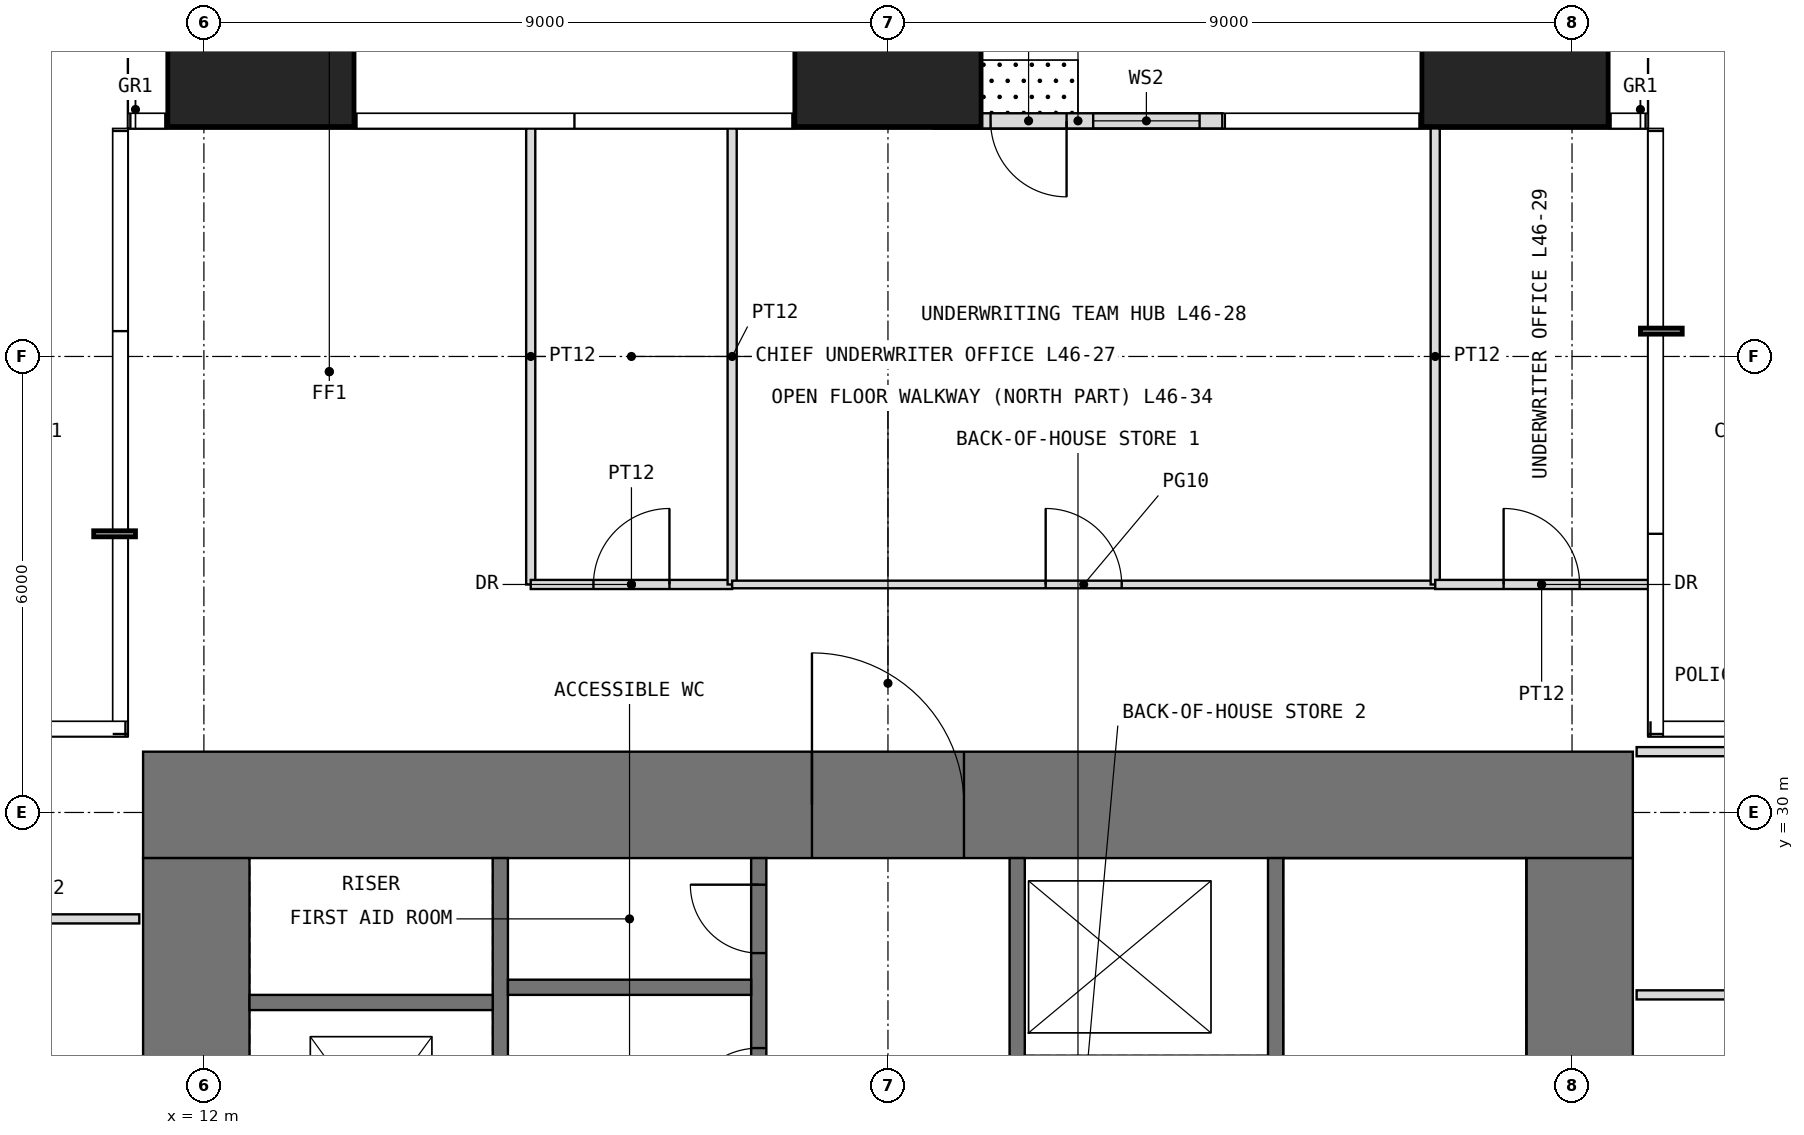
"""IFC4 building model, lengths in metres.
Left out: names, types, materials, properties, quantities, classifications, styles, units other than length and angle.
Written with IfcOpenShell. Run it as: python <this file> out.ifc"""

import sys

from ifc_helpers import new_model, si_unit, direction, frame, frame_2d, origin, origin_2d, place, context, subcontext, project, spatial, rectangle, extrude, element, fill, save


model = new_model("IFC4")
c1 = context("Model", 3, precision=1e-05, world=origin(), true_north=direction((0.0, 1.0)))
c2 = subcontext(c1, "Body", "Model", "MODEL_VIEW")
j1 = project(units=[si_unit("LENGTHUNIT", "METRE"), si_unit("PLANEANGLEUNIT", "RADIAN")], contexts=[c1])
p1 = place(None, origin())
s1 = spatial("IfcSite", under=j1, at=p1, CompositionType="ELEMENT")
p2 = place(p1, origin())
s2 = spatial("IfcBuilding", under=s1, at=p2, CompositionType="ELEMENT")
p3 = place(p2, frame((0.0, 0.0, 194.5)))
s3 = spatial("IfcBuildingStorey", under=s2, at=p3, CompositionType="ELEMENT", Elevation=194.5)
for number, where, z_axis, x_axis in (
    (1, (12.75, 40.25, 0.0), (0.0, 0.0, 1.0), (1.0, 0.0, 0.0)),
    (2, (21.0, 40.25, 0.0), (0.0, 0.0, 1.0), (1.0, 0.0, 0.0)),
    (3, (29.25, 40.25, 0.0), (0.0, 0.0, 1.0), (1.0, 0.0, 0.0)),
):
    element("IfcColumn", number, at=place(p3, frame(where, z_axis=z_axis, x_axis=x_axis)), inside=s3, PredefinedType="COLUMN", context=c2, shape_type="SweptSolid", body=[
        extrude(rectangle(XDim=2.45, YDim=2.45, at=origin_2d()), origin(), (0.0, 0.0, 1.0), 4.0),
    ])
p4 = place(p3, frame((25.4, 39.1, 0.0), z_axis=(0.0, 0.0, 1.0), x_axis=(-1.0, 0.0, 0.0)))
e4 = element("IfcWall", 4, at=p4, inside=s3, PredefinedType="USERDEFINED", context=c2, shape_type="SweptSolid", body=[
    extrude(rectangle(XDim=3.8, YDim=0.2, at=frame_2d((1.9, 0.0))), origin(), (0.0, 0.0, 1.0), 3.75),
])
p5 = place(p4, frame((2.05, 0.0, 0.0)))
e5 = element("IfcOpeningElement", 5, at=p5, cuts=e4, PredefinedType="OPENING", context=c2, shape_type="SweptSolid", body=[
    extrude(rectangle(XDim=1.0, YDim=2.4, at=frame_2d((0.5, 1.2))), frame((0.0, 0.11, 0.0), z_axis=(0.0, -1.0, 0.0), x_axis=(1.0, 0.0, 0.0)), (0.0, 0.0, 1.0), 0.22),
])
p6 = place(p4, frame((0.3, 0.0, 0.3)))
e6 = element("IfcOpeningElement", 6, at=p6, cuts=e4, PredefinedType="OPENING", context=c2, shape_type="SweptSolid", body=[
    extrude(rectangle(XDim=1.4, YDim=2.7, at=frame_2d((0.7, 1.35))), frame((0.0, 0.11, 0.0), z_axis=(0.0, -1.0, 0.0), x_axis=(1.0, 0.0, 0.0)), (0.0, 0.0, 1.0), 0.22),
])
p7 = place(p3, frame((11.2, 30.1, -0.05), z_axis=(0.0, 0.0, 1.0), x_axis=(1.0, 0.0, 0.0)))
e7 = element("IfcWall", 7, at=p7, inside=s3, PredefinedType="SHEAR", context=c2, shape_type="SweptSolid", body=[
    extrude(rectangle(XDim=19.6, YDim=1.4, at=frame_2d((9.8, 0.0))), origin(), (0.0, 0.0, 1.0), 4.0),
])
p8 = place(p7, frame((8.8, 0.0, 0.05)))
e8 = element("IfcOpeningElement", 8, at=p8, cuts=e7, PredefinedType="OPENING", context=c2, shape_type="SweptSolid", body=[
    extrude(rectangle(XDim=2.0, YDim=2.2, at=frame_2d((1.0, 1.1))), frame((0.0, 0.71, 0.0), z_axis=(0.0, -1.0, 0.0), x_axis=(1.0, 0.0, 0.0)), (0.0, 0.0, 1.0), 1.42),
])
p9 = place(p3, frame((11.9, 12.6, -0.05), z_axis=(0.0, 0.0, 1.0), x_axis=(0.0, 1.0, 0.0)))
e9 = element("IfcWall", 9, at=p9, inside=s3, PredefinedType="SHEAR", context=c2, shape_type="SweptSolid", body=[
    extrude(rectangle(XDim=16.8, YDim=1.4, at=frame_2d((8.4, 0.0))), origin(), (0.0, 0.0, 1.0), 4.0),
])
p10 = place(p9, frame((9.9, 0.0, 0.05)))
e10 = element("IfcOpeningElement", 10, at=p10, cuts=e9, PredefinedType="OPENING", context=c2, shape_type="SweptSolid", body=[
    extrude(rectangle(XDim=1.0, YDim=2.2, at=frame_2d((0.5, 1.1))), frame((0.0, 0.71, 0.0), z_axis=(0.0, -1.0, 0.0), x_axis=(1.0, 0.0, 0.0)), (0.0, 0.0, 1.0), 1.42),
])
p11 = place(p3, frame((30.1, 12.6, -0.05), z_axis=(0.0, 0.0, 1.0), x_axis=(0.0, 1.0, 0.0)))
e11 = element("IfcWall", 11, at=p11, inside=s3, PredefinedType="SHEAR", context=c2, shape_type="SweptSolid", body=[
    extrude(rectangle(XDim=16.8, YDim=1.4, at=frame_2d((8.4, 0.0))), origin(), (0.0, 0.0, 1.0), 4.0),
])
p12 = place(p11, frame((5.9, 0.0, 0.05)))
e12 = element("IfcOpeningElement", 12, at=p12, cuts=e11, PredefinedType="OPENING", context=c2, shape_type="SweptSolid", body=[
    extrude(rectangle(XDim=1.0, YDim=2.2, at=frame_2d((0.5, 1.1))), frame((0.0, 0.71, 0.0), z_axis=(0.0, -1.0, 0.0), x_axis=(1.0, 0.0, 0.0)), (0.0, 0.0, 1.0), 1.42),
])
p13 = place(p3, frame((15.9, 12.6, -0.05), z_axis=(0.0, 0.0, 1.0), x_axis=(0.0, 1.0, 0.0)))
e13 = element("IfcWall", 13, at=p13, inside=s3, PredefinedType="SHEAR", context=c2, shape_type="SweptSolid", body=[
    extrude(rectangle(XDim=16.8, YDim=0.2, at=frame_2d((8.4, 0.0))), origin(), (0.0, 0.0, 1.0), 4.0),
])
p14 = place(p13, frame((8.9, 0.0, 0.05)))
e14 = element("IfcOpeningElement", 14, at=p14, cuts=e13, PredefinedType="OPENING", context=c2, shape_type="SweptSolid", body=[
    extrude(rectangle(XDim=1.0, YDim=2.2, at=frame_2d((0.5, 1.1))), frame((0.0, 0.11, 0.0), z_axis=(0.0, -1.0, 0.0), x_axis=(1.0, 0.0, 0.0)), (0.0, 0.0, 1.0), 0.22),
])
p15 = place(p3, frame((19.3, 12.6, -0.05), z_axis=(0.0, 0.0, 1.0), x_axis=(0.0, 1.0, 0.0)))
e15 = element("IfcWall", 15, at=p15, inside=s3, PredefinedType="SHEAR", context=c2, shape_type="SweptSolid", body=[
    extrude(rectangle(XDim=16.8, YDim=0.2, at=frame_2d((8.4, 0.0))), origin(), (0.0, 0.0, 1.0), 4.0),
])
p16 = place(p15, frame((8.7, 0.0, 0.05)))
e16 = element("IfcOpeningElement", 16, at=p16, cuts=e15, PredefinedType="OPENING", context=c2, shape_type="SweptSolid", body=[
    extrude(rectangle(XDim=1.0, YDim=2.2, at=frame_2d((0.5, 1.1))), frame((0.0, 0.11, 0.0), z_axis=(0.0, -1.0, 0.0), x_axis=(1.0, 0.0, 0.0)), (0.0, 0.0, 1.0), 0.22),
])
p17 = place(p15, frame((10.85, 0.0, 0.05)))
e17 = element("IfcOpeningElement", 17, at=p17, cuts=e15, PredefinedType="OPENING", context=c2, shape_type="SweptSolid", body=[
    extrude(rectangle(XDim=0.9, YDim=2.2, at=frame_2d((0.45, 1.1))), frame((0.0, 0.11, 0.0), z_axis=(0.0, -1.0, 0.0), x_axis=(1.0, 0.0, 0.0)), (0.0, 0.0, 1.0), 0.22),
])
p18 = place(p15, frame((13.3, 0.0, 0.05)))
e18 = element("IfcOpeningElement", 18, at=p18, cuts=e15, PredefinedType="OPENING", context=c2, shape_type="SweptSolid", body=[
    extrude(rectangle(XDim=1.0, YDim=2.2, at=frame_2d((0.5, 1.1))), frame((0.0, 0.11, 0.0), z_axis=(0.0, -1.0, 0.0), x_axis=(1.0, 0.0, 0.0)), (0.0, 0.0, 1.0), 0.22),
])
p19 = place(p15, frame((15.55, 0.0, 0.05)))
e19 = element("IfcOpeningElement", 19, at=p19, cuts=e15, PredefinedType="OPENING", context=c2, shape_type="SweptSolid", body=[
    extrude(rectangle(XDim=0.9, YDim=2.2, at=frame_2d((0.45, 1.1))), frame((0.0, 0.11, 0.0), z_axis=(0.0, -1.0, 0.0), x_axis=(1.0, 0.0, 0.0)), (0.0, 0.0, 1.0), 0.22),
])
p20 = place(p15, frame((0.75, 0.0, 0.05)))
e20 = element("IfcOpeningElement", 20, at=p20, cuts=e15, PredefinedType="OPENING", context=c2, shape_type="SweptSolid", body=[
    extrude(rectangle(XDim=1.1, YDim=2.2, at=frame_2d((0.55, 1.1))), frame((0.0, 0.11, 0.0), z_axis=(0.0, -1.0, 0.0), x_axis=(1.0, 0.0, 0.0)), (0.0, 0.0, 1.0), 0.22),
])
p21 = place(p15, frame((3.55, 0.0, 0.05)))
e21 = element("IfcOpeningElement", 21, at=p21, cuts=e15, PredefinedType="OPENING", context=c2, shape_type="SweptSolid", body=[
    extrude(rectangle(XDim=1.1, YDim=2.2, at=frame_2d((0.55, 1.1))), frame((0.0, 0.11, 0.0), z_axis=(0.0, -1.0, 0.0), x_axis=(1.0, 0.0, 0.0)), (0.0, 0.0, 1.0), 0.22),
])
p22 = place(p15, frame((6.35, 0.0, 0.05)))
e22 = element("IfcOpeningElement", 22, at=p22, cuts=e15, PredefinedType="OPENING", context=c2, shape_type="SweptSolid", body=[
    extrude(rectangle(XDim=1.1, YDim=2.2, at=frame_2d((0.55, 1.1))), frame((0.0, 0.11, 0.0), z_axis=(0.0, -1.0, 0.0), x_axis=(1.0, 0.0, 0.0)), (0.0, 0.0, 1.0), 0.22),
])
p23 = place(p3, frame((22.7, 12.6, -0.05), z_axis=(0.0, 0.0, 1.0), x_axis=(0.0, 1.0, 0.0)))
e23 = element("IfcWall", 23, at=p23, inside=s3, PredefinedType="SHEAR", context=c2, shape_type="SweptSolid", body=[
    extrude(rectangle(XDim=16.8, YDim=0.2, at=frame_2d((8.4, 0.0))), origin(), (0.0, 0.0, 1.0), 4.0),
])
p24 = place(p23, frame((3.05, 0.0, 0.05)))
e24 = element("IfcOpeningElement", 24, at=p24, cuts=e23, PredefinedType="OPENING", context=c2, shape_type="SweptSolid", body=[
    extrude(rectangle(XDim=0.9, YDim=2.2, at=frame_2d((0.45, 1.1))), frame((0.0, 0.11, 0.0), z_axis=(0.0, -1.0, 0.0), x_axis=(1.0, 0.0, 0.0)), (0.0, 0.0, 1.0), 0.22),
])
p25 = place(p23, frame((7.1, 0.0, 0.05)))
e25 = element("IfcOpeningElement", 25, at=p25, cuts=e23, PredefinedType="OPENING", context=c2, shape_type="SweptSolid", body=[
    extrude(rectangle(XDim=1.0, YDim=2.2, at=frame_2d((0.5, 1.1))), frame((0.0, 0.11, 0.0), z_axis=(0.0, -1.0, 0.0), x_axis=(1.0, 0.0, 0.0)), (0.0, 0.0, 1.0), 0.22),
])
p26 = place(p23, frame((1.55, 0.0, 0.05)))
e26 = element("IfcOpeningElement", 26, at=p26, cuts=e23, PredefinedType="OPENING", context=c2, shape_type="SweptSolid", body=[
    extrude(rectangle(XDim=0.9, YDim=2.2, at=frame_2d((0.45, 1.1))), frame((0.0, 0.11, 0.0), z_axis=(0.0, -1.0, 0.0), x_axis=(1.0, 0.0, 0.0)), (0.0, 0.0, 1.0), 0.22),
])
p27 = place(p23, frame((4.95, 0.0, 0.05)))
e27 = element("IfcOpeningElement", 27, at=p27, cuts=e23, PredefinedType="OPENING", context=c2, shape_type="SweptSolid", body=[
    extrude(rectangle(XDim=0.9, YDim=2.2, at=frame_2d((0.45, 1.1))), frame((0.0, 0.11, 0.0), z_axis=(0.0, -1.0, 0.0), x_axis=(1.0, 0.0, 0.0)), (0.0, 0.0, 1.0), 0.22),
])
p28 = place(p23, frame((9.4, 0.0, 0.05)))
e28 = element("IfcOpeningElement", 28, at=p28, cuts=e23, PredefinedType="OPENING", context=c2, shape_type="SweptSolid", body=[
    extrude(rectangle(XDim=1.0, YDim=2.2, at=frame_2d((0.5, 1.1))), frame((0.0, 0.11, 0.0), z_axis=(0.0, -1.0, 0.0), x_axis=(1.0, 0.0, 0.0)), (0.0, 0.0, 1.0), 0.22),
])
p29 = place(p23, frame((12.2, 0.0, 0.05)))
e29 = element("IfcOpeningElement", 29, at=p29, cuts=e23, PredefinedType="OPENING", context=c2, shape_type="SweptSolid", body=[
    extrude(rectangle(XDim=1.0, YDim=2.2, at=frame_2d((0.5, 1.1))), frame((0.0, 0.11, 0.0), z_axis=(0.0, -1.0, 0.0), x_axis=(1.0, 0.0, 0.0)), (0.0, 0.0, 1.0), 0.22),
])
p30 = place(p3, frame((26.1, 12.6, -0.05), z_axis=(0.0, 0.0, 1.0), x_axis=(0.0, 1.0, 0.0)))
e30 = element("IfcWall", 30, at=p30, inside=s3, PredefinedType="SHEAR", context=c2, shape_type="SweptSolid", body=[
    extrude(rectangle(XDim=16.8, YDim=0.2, at=frame_2d((8.4, 0.0))), origin(), (0.0, 0.0, 1.0), 4.0),
])
p31 = place(p30, frame((6.9, 0.0, 0.05)))
e31 = element("IfcOpeningElement", 31, at=p31, cuts=e30, PredefinedType="OPENING", context=c2, shape_type="SweptSolid", body=[
    extrude(rectangle(XDim=1.0, YDim=2.2, at=frame_2d((0.5, 1.1))), frame((0.0, 0.11, 0.0), z_axis=(0.0, -1.0, 0.0), x_axis=(1.0, 0.0, 0.0)), (0.0, 0.0, 1.0), 0.22),
])
for number, where, z_axis, x_axis in (
    (32, (12.6, 27.5, -0.05), (0.0, 0.0, 1.0), (1.0, 0.0, 0.0)),
    (33, (16.0, 27.7, -0.05), (0.0, 0.0, 1.0), (1.0, 0.0, 0.0)),
):
    element("IfcWall", number, at=place(p3, frame(where, z_axis=z_axis, x_axis=x_axis)), inside=s3, PredefinedType="SHEAR", context=c2, shape_type="SweptSolid", body=[
        extrude(rectangle(XDim=3.2, YDim=0.2, at=frame_2d((1.6, 0.0))), origin(), (0.0, 0.0, 1.0), 4.0),
    ])
p32 = place(p3, frame((7.8, 28.6, 0.0), z_axis=(0.0, 0.0, 1.0), x_axis=(1.0, 0.0, 0.0)))
e34 = element("IfcWall", 34, at=p32, inside=s3, PredefinedType="PARTITIONING", context=c2, shape_type="SweptSolid", body=[
    extrude(rectangle(XDim=3.35, YDim=0.12, at=frame_2d((1.675, 0.0))), origin(), (0.0, 0.0, 1.0), 3.75),
])
p33 = place(p3, frame((16.3, 33.0, 0.0), z_axis=(0.0, 0.0, 1.0), x_axis=(0.0, 1.0, 0.0)))
e35 = element("IfcWall", 35, at=p33, inside=s3, PredefinedType="PARTITIONING", context=c2, shape_type="SweptSolid", body=[
    extrude(rectangle(XDim=6.0, YDim=0.12, at=frame_2d((3.0, 0.0))), origin(), (0.0, 0.0, 1.0), 3.75),
])
p34 = place(p3, frame((16.3, 33.0, 0.0), z_axis=(0.0, 0.0, 1.0), x_axis=(1.0, 0.0, 0.0)))
e36 = element("IfcWall", 36, at=p34, inside=s3, PredefinedType="PARTITIONING", context=c2, shape_type="SweptSolid", body=[
    extrude(rectangle(XDim=2.65, YDim=0.12, at=frame_2d((1.325, 0.0))), origin(), (0.0, 0.0, 1.0), 3.75),
])
p35 = place(p34, frame((0.825, 0.0, 0.0)))
e37 = element("IfcOpeningElement", 37, at=p35, cuts=e36, PredefinedType="OPENING", context=c2, shape_type="SweptSolid", body=[
    extrude(rectangle(XDim=1.0, YDim=2.2, at=frame_2d((0.5, 1.1))), frame((0.0, 0.07, 0.0), z_axis=(0.0, -1.0, 0.0), x_axis=(1.0, 0.0, 0.0)), (0.0, 0.0, 1.0), 0.14),
])
p36 = place(p3, frame((18.95, 33.0, 0.0), z_axis=(0.0, 0.0, 1.0), x_axis=(0.0, 1.0, 0.0)))
e38 = element("IfcWall", 38, at=p36, inside=s3, PredefinedType="PARTITIONING", context=c2, shape_type="SweptSolid", body=[
    extrude(rectangle(XDim=6.0, YDim=0.12, at=frame_2d((3.0, 0.0))), origin(), (0.0, 0.0, 1.0), 3.75),
])
p37 = place(p3, frame((18.95, 33.0, 0.0), z_axis=(0.0, 0.0, 1.0), x_axis=(1.0, 0.0, 0.0)))
e39 = element("IfcWall", 39, at=p37, inside=s3, PredefinedType="PARTITIONING", context=c2, shape_type="SweptSolid", body=[
    extrude(rectangle(XDim=9.25, YDim=0.1, at=frame_2d((4.625, 0.0))), origin(), (0.0, 0.0, 1.0), 3.75),
])
p38 = place(p37, frame((4.125, 0.0, 0.0)))
e40 = element("IfcOpeningElement", 40, at=p38, cuts=e39, PredefinedType="OPENING", context=c2, shape_type="SweptSolid", body=[
    extrude(rectangle(XDim=1.0, YDim=2.4, at=frame_2d((0.5, 1.2))), frame((0.0, 0.06, 0.0), z_axis=(0.0, -1.0, 0.0), x_axis=(1.0, 0.0, 0.0)), (0.0, 0.0, 1.0), 0.12),
])
p39 = place(p3, frame((28.2, 33.0, 0.0), z_axis=(0.0, 0.0, 1.0), x_axis=(0.0, 1.0, 0.0)))
e41 = element("IfcWall", 41, at=p39, inside=s3, PredefinedType="PARTITIONING", context=c2, shape_type="SweptSolid", body=[
    extrude(rectangle(XDim=6.0, YDim=0.12, at=frame_2d((3.0, 0.0))), origin(), (0.0, 0.0, 1.0), 3.75),
])
p40 = place(p3, frame((28.2, 33.0, 0.0), z_axis=(0.0, 0.0, 1.0), x_axis=(1.0, 0.0, 0.0)))
e42 = element("IfcWall", 42, at=p40, inside=s3, PredefinedType="PARTITIONING", context=c2, shape_type="SweptSolid", body=[
    extrude(rectangle(XDim=2.8, YDim=0.12, at=frame_2d((1.4, 0.0))), origin(), (0.0, 0.0, 1.0), 3.75),
])
p41 = place(p40, frame((0.9, 0.0, 0.0)))
e43 = element("IfcOpeningElement", 43, at=p41, cuts=e42, PredefinedType="OPENING", context=c2, shape_type="SweptSolid", body=[
    extrude(rectangle(XDim=1.0, YDim=2.2, at=frame_2d((0.5, 1.1))), frame((0.0, 0.07, 0.0), z_axis=(0.0, -1.0, 0.0), x_axis=(1.0, 0.0, 0.0)), (0.0, 0.0, 1.0), 0.14),
])
for number, where, z_axis, x_axis in (
    (44, (30.85, 27.6, 0.0), (0.0, 0.0, 1.0), (1.0, 0.0, 0.0)),
    (45, (30.85, 30.8, 0.0), (0.0, 0.0, 1.0), (1.0, 0.0, 0.0)),
):
    element("IfcWall", number, at=place(p3, frame(where, z_axis=z_axis, x_axis=x_axis)), inside=s3, PredefinedType="PARTITIONING", context=c2, shape_type="SweptSolid", body=[
        extrude(rectangle(XDim=4.25, YDim=0.12, at=frame_2d((2.125, 0.0))), origin(), (0.0, 0.0, 1.0), 3.75),
    ])
p42 = place(p5, origin())
e46 = element("IfcDoor", 46, at=p42, inside=s3, OperationType="SINGLE_SWING_LEFT", PredefinedType="DOOR", context=c2, shape_type="SweptSolid", body=[
    extrude(rectangle(XDim=1.0, YDim=2.4, at=frame_2d((0.5, 1.2))), frame((0.0, 0.025, 0.0), z_axis=(0.0, -1.0, 0.0), x_axis=(1.0, 0.0, 0.0)), (0.0, 0.0, 1.0), 0.05),
])
fill(e5, e46)
p43 = place(p6, origin())
e47 = element("IfcWindow", 47, at=p43, inside=s3, PartitioningType="SINGLE_PANEL", PredefinedType="WINDOW", context=c2, shape_type="SweptSolid", body=[
    extrude(rectangle(XDim=1.4, YDim=2.7, at=frame_2d((0.7, 1.35))), frame((0.0, 0.03, 0.0), z_axis=(0.0, -1.0, 0.0), x_axis=(1.0, 0.0, 0.0)), (0.0, 0.0, 1.0), 0.06),
])
fill(e6, e47)
p44 = place(p8, origin())
e48 = element("IfcDoor", 48, at=p44, inside=s3, OperationType="DOUBLE_DOOR_SINGLE_SWING", PredefinedType="DOOR", context=c2, shape_type="SweptSolid", body=[
    extrude(rectangle(XDim=2.0, YDim=2.2, at=frame_2d((1.0, 1.1))), frame((0.0, 0.025, 0.0), z_axis=(0.0, -1.0, 0.0), x_axis=(1.0, 0.0, 0.0)), (0.0, 0.0, 1.0), 0.05),
])
fill(e8, e48)
p45 = place(p18, origin())
e49 = element("IfcDoor", 49, at=p45, inside=s3, OperationType="SINGLE_SWING_LEFT", PredefinedType="DOOR", context=c2, shape_type="SweptSolid", body=[
    extrude(rectangle(XDim=1.0, YDim=2.2, at=frame_2d((0.5, 1.1))), frame((0.0, 0.025, 0.0), z_axis=(0.0, -1.0, 0.0), x_axis=(1.0, 0.0, 0.0)), (0.0, 0.0, 1.0), 0.05),
])
fill(e18, e49)
p46 = place(p19, origin())
e50 = element("IfcDoor", 50, at=p46, inside=s3, OperationType="SINGLE_SWING_RIGHT", PredefinedType="DOOR", context=c2, shape_type="SweptSolid", body=[
    extrude(rectangle(XDim=0.9, YDim=2.2, at=frame_2d((0.45, 1.1))), frame((0.0, 0.025, 0.0), z_axis=(0.0, -1.0, 0.0), x_axis=(1.0, 0.0, 0.0)), (0.0, 0.0, 1.0), 0.05),
])
fill(e19, e50)
p47 = place(p35, origin())
e51 = element("IfcDoor", 51, at=p47, inside=s3, OperationType="SINGLE_SWING_RIGHT", PredefinedType="DOOR", context=c2, shape_type="SweptSolid", body=[
    extrude(rectangle(XDim=1.0, YDim=2.2, at=frame_2d((0.5, 1.1))), frame((0.0, 0.025, 0.0), z_axis=(0.0, -1.0, 0.0), x_axis=(1.0, 0.0, 0.0)), (0.0, 0.0, 1.0), 0.05),
])
fill(e37, e51)
p48 = place(p38, origin())
e52 = element("IfcDoor", 52, at=p48, inside=s3, OperationType="SINGLE_SWING_LEFT", PredefinedType="DOOR", context=c2, shape_type="SweptSolid", body=[
    extrude(rectangle(XDim=1.0, YDim=2.4, at=frame_2d((0.5, 1.2))), frame((0.0, 0.025, 0.0), z_axis=(0.0, -1.0, 0.0), x_axis=(1.0, 0.0, 0.0)), (0.0, 0.0, 1.0), 0.05),
])
fill(e40, e52)
p49 = place(p41, origin())
e53 = element("IfcDoor", 53, at=p49, inside=s3, OperationType="SINGLE_SWING_LEFT", PredefinedType="DOOR", context=c2, shape_type="SweptSolid", body=[
    extrude(rectangle(XDim=1.0, YDim=2.2, at=frame_2d((0.5, 1.1))), frame((0.0, 0.025, 0.0), z_axis=(0.0, -1.0, 0.0), x_axis=(1.0, 0.0, 0.0)), (0.0, 0.0, 1.0), 0.05),
])
fill(e43, e53)
save(model, sys.argv[1])
